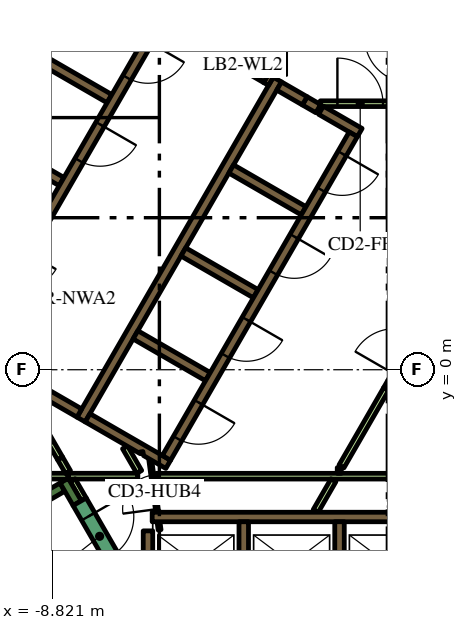
"""IFC4 building model, lengths in metres.
Left out: names, types, materials, properties, quantities, classifications, styles, units other than length and angle.
Written with IfcOpenShell. Run it as: python <this file> out.ifc"""

import sys

from ifc_helpers import new_model, si_unit, direction, frame, frame_2d, origin, place, context, subcontext, project, spatial, polyline, rectangle, outline, extrude, element, fill, save


model = new_model("IFC4")
c1 = context("Model", 3, precision=1e-05, world=origin(), true_north=direction((0.0, 1.0)))
c2 = subcontext(c1, "Body", "Model", "MODEL_VIEW")
j1 = project(units=[si_unit("LENGTHUNIT", "METRE"), si_unit("PLANEANGLEUNIT", "RADIAN")], contexts=[c1])
p1 = place(None, origin())
s1 = spatial("IfcSite", under=j1, at=p1, CompositionType="ELEMENT")
p2 = place(p1, origin())
s2 = spatial("IfcBuilding", under=s1, at=p2, CompositionType="ELEMENT")
p3 = place(p2, frame((0.0, 0.0, 134.4)))
s3 = spatial("IfcBuildingStorey", under=s2, at=p3, CompositionType="ELEMENT", Elevation=134.4)
p4 = place(p3, frame((-14.268, 0.387, 0.0), z_axis=(0.0, 0.0, 1.0), x_axis=(0.499994617707, 0.866028511231, 0.0)))
e1 = element("IfcWall", 1, at=p4, inside=s3, PredefinedType="SOLIDWALL", context=c2, shape_type="SweptSolid", body=[
    extrude(rectangle(XDim=18.817, YDim=0.9, at=frame_2d((9.409, 0.0))), origin(), (0.0, 0.0, 1.0), 7.2),
])
p5 = place(p3, frame((-14.44, -6.49, 0.0), z_axis=(0.0, 0.0, 1.0), x_axis=(0.866022966069, 0.500004222222, 0.0)))
e2 = element("IfcWall", 2, at=p5, inside=s3, PredefinedType="SOLIDWALL", context=c2, shape_type="SweptSolid", body=[
    extrude(rectangle(XDim=6.8, YDim=0.25, at=frame_2d((3.4, 0.0))), origin(), (0.0, 0.0, 1.0), 7.2),
])
p6 = place(p3, frame((-8.163, -3.511, 0.0), z_axis=(0.0, 0.0, 1.0), x_axis=(-0.500206266495, 0.865906283012, 0.0)))
e3 = element("IfcWall", 3, at=p6, inside=s3, PredefinedType="SOLIDWALL", context=c2, shape_type="SweptSolid", body=[
    extrude(rectangle(XDim=0.684, YDim=0.25, at=frame_2d((0.342, 0.0))), origin(), (0.0, 0.0, 1.0), 7.2),
])
p7 = place(p3, frame((-6.3, -4.24, 0.0), z_axis=(0.0, 0.0, 1.0), x_axis=(0.0, -1.0, 0.0)))
e4 = element("IfcWall", 4, at=p7, inside=s3, PredefinedType="SOLIDWALL", context=c2, shape_type="SweptSolid", body=[
    extrude(rectangle(XDim=2.914, YDim=0.25, at=frame_2d((1.457, 0.0))), origin(), (0.0, 0.0, 1.0), 7.2),
])
p8 = place(p3, frame((-6.19, -3.875, 0.0), z_axis=(0.0, 0.0, 1.0), x_axis=(1.0, 0.0, 0.0)))
e5 = element("IfcWall", 5, at=p8, inside=s3, PredefinedType="SOLIDWALL", context=c2, shape_type="SweptSolid", body=[
    extrude(rectangle(XDim=12.615, YDim=0.25, at=frame_2d((6.307, 0.0))), origin(), (0.0, 0.0, 1.0), 7.2),
])
for number, where, z_axis, x_axis in (
    (6, (-1.26, -4.0, 0.0), (0.0, 0.0, 1.0), (0.0, -1.0, 0.0)),
    (7, (-3.78, -4.0, 0.0), (0.0, 0.0, 1.0), (0.0, -1.0, 0.0)),
):
    element("IfcWall", number, at=place(p3, frame(where, z_axis=z_axis, x_axis=x_axis)), inside=s3, PredefinedType="SOLIDWALL", context=c2, shape_type="SweptSolid", body=[
        extrude(rectangle(XDim=2.2, YDim=0.25, at=frame_2d((1.1, 0.0))), origin(), (0.0, 0.0, 1.0), 7.2),
    ])
p9 = place(p3, frame((-8.06, -1.311, 0.0), z_axis=(0.0, 0.0, 1.0), x_axis=(0.50000273126, 0.866023826885, 0.0)))
e8 = element("IfcWall", 8, at=p9, inside=s3, PredefinedType="SOLIDWALL", context=c2, shape_type="SweptSolid", body=[
    extrude(rectangle(XDim=10.33, YDim=0.25, at=frame_2d((5.165, 0.0))), origin(), (0.0, 0.0, 1.0), 7.2),
])
p10 = place(p3, frame((-1.819, 6.87, 0.0), z_axis=(0.0, 0.0, 1.0), x_axis=(-0.866294599386, 0.499533449405, 0.0)))
e9 = element("IfcWall", 9, at=p10, inside=s3, PredefinedType="SOLIDWALL", context=c2, shape_type="SweptSolid", body=[
    extrude(rectangle(XDim=0.41, YDim=0.25, at=frame_2d((0.205, 0.0))), origin(), (0.0, 0.0, 1.0), 7.2),
])
p11 = place(p3, frame((-2.849, 7.465, 0.0), z_axis=(0.0, 0.0, 1.0), x_axis=(0.865955664968, -0.500120771724, 0.0)))
e10 = element("IfcWall", 10, at=p11, inside=s3, PredefinedType="SOLIDWALL", context=c2, shape_type="SweptSolid", body=[
    extrude(rectangle(XDim=0.778, YDim=0.25, at=frame_2d((0.389, 0.0))), origin(), (0.0, 0.0, 1.0), 7.2),
])
p12 = place(p3, frame((-0.728, 6.24, 0.0), z_axis=(0.0, 0.0, 1.0), x_axis=(-0.866002680491, 0.500039355833, 0.0)))
e11 = element("IfcWall", 11, at=p12, inside=s3, PredefinedType="SOLIDWALL", context=c2, shape_type="SweptSolid", body=[
    extrude(rectangle(XDim=1.178, YDim=0.25, at=frame_2d((0.589, 0.0))), origin(), (0.0, 0.0, 1.0), 7.2),
])
for number, where, z_axis, x_axis in (
    (12, (-2.204, 4.182, 0.0), (0.0, 0.0, 1.0), (-0.866, 0.5, 0.0)),
    (13, (-5.369, 3.1, 0.0), (0.0, 0.0, 1.0), (0.866, -0.5, 0.0)),
    (14, (-4.724, -0.182, 0.0), (0.0, 0.0, 1.0), (-0.866, 0.5, 0.0)),
):
    element("IfcWall", number, at=place(p3, frame(where, z_axis=z_axis, x_axis=x_axis)), inside=s3, PredefinedType="SOLIDWALL", context=c2, shape_type="SweptSolid", body=[
        extrude(rectangle(XDim=2.2, YDim=0.25, at=frame_2d((1.1, 0.0))), origin(), (0.0, 0.0, 1.0), 7.2),
    ])
p13 = place(p3, origin())
e15 = element("IfcWall", 15, at=p13, inside=s3, PredefinedType="SOLIDWALL", context=c2, shape_type="SweptSolid", body=[
    extrude(outline(polyline([(-5.922, -2.257), (-5.922, -2.257), (-5.705, -2.382), (-5.83, -2.598), (-6.418, -2.258), (-6.433, -2.153), (-6.433, -2.153), (-6.433, -2.153), (-6.508, -2.163), (-6.508, -2.163), (-6.508, -2.163), (-6.501, -2.21), (-7.952, -1.373), (-7.827, -1.156), (-5.922, -2.257)])), origin(), (0.0, 0.0, 1.0), 7.2),
])
p14 = place(p3, frame((-9.265, -0.471, 0.0), z_axis=(0.0, 0.0, 1.0), x_axis=(0.865954634268, -0.500122556369, 0.0)))
e16 = element("IfcWall", 16, at=p14, inside=s3, PredefinedType="SOLIDWALL", context=c2, shape_type="SweptSolid", body=[
    extrude(rectangle(XDim=1.338, YDim=0.25, at=frame_2d((0.669, 0.0))), origin(), (0.0, 0.0, 1.0), 7.2),
])
e17 = element("IfcWall", 17, at=p13, inside=s3, PredefinedType="SOLIDWALL", context=c2, shape_type="SweptSolid", body=[
    extrude(outline(polyline([(-3.128, 7.481), (-3.259, 7.557), (-3.134, 7.773), (-3.003, 7.698), (-3.128, 7.481)])), origin(), (0.0, 0.0, 1.0), 7.2),
])
for number, where, z_axis, x_axis in (
    (18, (-8.574, 4.95, 0.0), (0.0, 0.0, 1.0), (-0.866, 0.5, 0.0)),
    (19, (-7.314, 7.132, 0.0), (0.0, 0.0, 1.0), (-0.866, 0.5, 0.0)),
):
    element("IfcWall", number, at=place(p3, frame(where, z_axis=z_axis, x_axis=x_axis)), inside=s3, PredefinedType="SOLIDWALL", context=c2, shape_type="SweptSolid", body=[
        extrude(rectangle(XDim=2.2, YDim=0.25, at=frame_2d((1.1, 0.0))), origin(), (0.0, 0.0, 1.0), 7.2),
    ])
p15 = place(p3, frame((-7.959, 10.415, 0.0), z_axis=(0.0, 0.0, 1.0), x_axis=(0.866020958405, -0.500007699544, 0.0)))
e20 = element("IfcWall", 20, at=p15, inside=s3, PredefinedType="SOLIDWALL", context=c2, shape_type="SweptSolid", body=[
    extrude(rectangle(XDim=4.1, YDim=0.25, at=frame_2d((2.05, 0.0))), origin(), (0.0, 0.0, 1.0), 7.2),
])
p16 = place(p3, frame((-8.395, -2.8, 0.0), z_axis=(0.0, 0.0, 1.0), x_axis=(1.0, 0.0, 0.0)))
e21 = element("IfcWall", 21, at=p16, inside=s3, PredefinedType="PARTITIONING", context=c2, shape_type="SweptSolid", body=[
    extrude(rectangle(XDim=1.828, YDim=0.15, at=frame_2d((0.914, 0.0))), origin(), (0.0, 0.0, 1.0), 6.15),
])
p17 = place(p3, frame((-11.115, -2.8, 0.0), z_axis=(0.0, 0.0, 1.0), x_axis=(1.0, 0.0, 0.0)))
e22 = element("IfcWall", 22, at=p17, inside=s3, PredefinedType="PARTITIONING", context=c2, shape_type="SweptSolid", body=[
    extrude(rectangle(XDim=2.708, YDim=0.15, at=frame_2d((1.354, 0.0))), origin(), (0.0, 0.0, 1.0), 6.15),
])
p18 = place(p3, frame((-6.531, -2.689, 0.0), z_axis=(0.0, 0.0, 1.0), x_axis=(-0.499967446111, 0.866044197965, 0.0)))
e23 = element("IfcWall", 23, at=p18, inside=s3, PredefinedType="PARTITIONING", context=c2, shape_type="SweptSolid", body=[
    extrude(rectangle(XDim=0.748, YDim=0.15, at=frame_2d((0.374, 0.0))), origin(), (0.0, 0.0, 1.0), 6.15),
])
p19 = place(p3, frame((-7.99, -3.412, 0.0), z_axis=(0.0, 0.0, 1.0), x_axis=(-0.500193841991, 0.86591346013, 0.0)))
e24 = element("IfcWall", 24, at=p19, inside=s3, PredefinedType="PARTITIONING", context=c2, shape_type="SweptSolid", body=[
    extrude(rectangle(XDim=0.583, YDim=0.15, at=frame_2d((0.292, 0.0))), origin(), (0.0, 0.0, 1.0), 6.15),
])
p20 = place(p3, frame((-8.612, -2.333, 0.0), z_axis=(0.0, 0.0, 1.0), x_axis=(0.500248216681, -0.86588204838, 0.0)))
e25 = element("IfcWall", 25, at=p20, inside=s3, PredefinedType="PARTITIONING", context=c2, shape_type="SweptSolid", body=[
    extrude(rectangle(XDim=0.415, YDim=0.15, at=frame_2d((0.208, 0.0))), origin(), (0.0, 0.0, 1.0), 6.15),
])
p21 = place(p3, frame((-6.086, -2.801, 0.0), z_axis=(0.0, 0.0, 1.0), x_axis=(1.0, 0.0, 0.0)))
e26 = element("IfcWall", 26, at=p21, inside=s3, PredefinedType="PARTITIONING", context=c2, shape_type="SweptSolid", body=[
    extrude(rectangle(XDim=7.524, YDim=0.15, at=frame_2d((3.762, 0.0))), origin(), (0.0, 0.0, 1.0), 6.15),
])
p22 = place(p3, frame((-1.887, -3.718, 0.0), z_axis=(0.0, 0.0, 1.0), x_axis=(0.499842898591, 0.866116087328, 0.0)))
e27 = element("IfcWall", 27, at=p22, inside=s3, PredefinedType="PARTITIONING", context=c2, shape_type="SweptSolid", body=[
    extrude(rectangle(XDim=0.936, YDim=0.15, at=frame_2d((0.468, 0.0))), origin(), (0.0, 0.0, 1.0), 6.15),
])
p23 = place(p3, frame((-1.212, -2.651, 0.0), z_axis=(0.0, 0.0, 1.0), x_axis=(-1.0, 0.0, 0.0)))
e28 = element("IfcWall", 28, at=p23, inside=s3, PredefinedType="PARTITIONING", context=c2, shape_type="SweptSolid", body=[
    extrude(rectangle(XDim=0.108, YDim=0.15, at=frame_2d((0.054, 0.0))), origin(), (0.0, 0.0, 1.0), 6.15),
])
p24 = place(p3, frame((-1.208, -2.544, 0.0), z_axis=(0.0, 0.0, 1.0), x_axis=(0.499995339376, 0.86602809458, 0.0)))
e29 = element("IfcWall", 29, at=p24, inside=s3, PredefinedType="PARTITIONING", context=c2, shape_type="SweptSolid", body=[
    extrude(rectangle(XDim=2.349, YDim=0.15, at=frame_2d((1.175, 0.0))), origin(), (0.0, 0.0, 1.0), 6.15),
])
p25 = place(p3, frame((-6.008, 9.144, 0.0), z_axis=(0.0, 0.0, 1.0), x_axis=(-0.500006956611, -0.866021387346, 0.0)))
e30 = element("IfcWall", 30, at=p25, inside=s3, PredefinedType="SOLIDWALL", context=c2, shape_type="SweptSolid", body=[
    extrude(rectangle(XDim=9.83, YDim=0.25, at=frame_2d((4.915, 0.0))), origin(), (0.0, 0.0, 1.0), 7.2),
])
p26 = place(p25, frame((0.585, 0.0, 0.0)))
e31 = element("IfcOpeningElement", 31, at=p26, cuts=e30, PredefinedType="OPENING", context=c2, shape_type="SweptSolid", body=[
    extrude(rectangle(XDim=1.1, YDim=2.1, at=frame_2d((0.55, 1.05))), frame((0.0, 0.135, 0.0), z_axis=(0.0, -1.0, 0.0), x_axis=(1.0, 0.0, 0.0)), (0.0, 0.0, 1.0), 0.27),
])
p27 = place(p25, frame((3.105, 0.0, 0.0)))
e32 = element("IfcOpeningElement", 32, at=p27, cuts=e30, PredefinedType="OPENING", context=c2, shape_type="SweptSolid", body=[
    extrude(rectangle(XDim=1.1, YDim=2.1, at=frame_2d((0.55, 1.05))), frame((0.0, 0.135, 0.0), z_axis=(0.0, -1.0, 0.0), x_axis=(1.0, 0.0, 0.0)), (0.0, 0.0, 1.0), 0.27),
])
p28 = place(p25, frame((6.985, 0.0, 0.0)))
e33 = element("IfcOpeningElement", 33, at=p28, cuts=e30, PredefinedType="OPENING", context=c2, shape_type="SweptSolid", body=[
    extrude(rectangle(XDim=0.9, YDim=2.1, at=frame_2d((0.45, 1.05))), frame((0.0, 0.135, 0.0), z_axis=(0.0, -1.0, 0.0), x_axis=(1.0, 0.0, 0.0)), (0.0, 0.0, 1.0), 0.27),
])
p29 = place(p3, frame((-0.898, 6.194, 0.0), z_axis=(0.0, 0.0, 1.0), x_axis=(-0.499996202215, -0.866027596426, 0.0)))
e34 = element("IfcWall", 34, at=p29, inside=s3, PredefinedType="SOLIDWALL", context=c2, shape_type="SweptSolid", body=[
    extrude(rectangle(XDim=9.83, YDim=0.25, at=frame_2d((4.915, 0.0))), origin(), (0.0, 0.0, 1.0), 7.2),
])
p30 = place(p29, frame((0.585, 0.0, 0.0)))
e35 = element("IfcOpeningElement", 35, at=p30, cuts=e34, PredefinedType="OPENING", context=c2, shape_type="SweptSolid", body=[
    extrude(rectangle(XDim=1.1, YDim=2.1, at=frame_2d((0.55, 1.05))), frame((0.0, 0.135, 0.0), z_axis=(0.0, -1.0, 0.0), x_axis=(1.0, 0.0, 0.0)), (0.0, 0.0, 1.0), 0.27),
])
p31 = place(p29, frame((3.105, 0.0, 0.0)))
e36 = element("IfcOpeningElement", 36, at=p31, cuts=e34, PredefinedType="OPENING", context=c2, shape_type="SweptSolid", body=[
    extrude(rectangle(XDim=1.1, YDim=2.1, at=frame_2d((0.55, 1.05))), frame((0.0, 0.135, 0.0), z_axis=(0.0, -1.0, 0.0), x_axis=(1.0, 0.0, 0.0)), (0.0, 0.0, 1.0), 0.27),
])
p32 = place(p29, frame((5.625, 0.0, 0.0)))
e37 = element("IfcOpeningElement", 37, at=p32, cuts=e34, PredefinedType="OPENING", context=c2, shape_type="SweptSolid", body=[
    extrude(rectangle(XDim=1.1, YDim=2.1, at=frame_2d((0.55, 1.05))), frame((0.0, 0.135, 0.0), z_axis=(0.0, -1.0, 0.0), x_axis=(1.0, 0.0, 0.0)), (0.0, 0.0, 1.0), 0.27),
])
p33 = place(p29, frame((8.145, 0.0, 0.0)))
e38 = element("IfcOpeningElement", 38, at=p33, cuts=e34, PredefinedType="OPENING", context=c2, shape_type="SweptSolid", body=[
    extrude(rectangle(XDim=1.1, YDim=2.1, at=frame_2d((0.55, 1.05))), frame((0.0, 0.135, 0.0), z_axis=(0.0, -1.0, 0.0), x_axis=(1.0, 0.0, 0.0)), (0.0, 0.0, 1.0), 0.27),
])
p34 = place(p3, frame((-8.098, -3.474, 0.0), z_axis=(0.0, 0.0, 1.0), x_axis=(0.49994051562, -0.866059744384, 0.0)))
e39 = element("IfcWall", 39, at=p34, inside=s3, PredefinedType="SOLIDWALL", context=c2, shape_type="SweptSolid", body=[
    extrude(rectangle(XDim=2.1, YDim=0.4, at=frame_2d((1.05, 0.0))), origin(), (0.0, 0.0, 1.0), 7.2),
])
p35 = place(p34, frame((0.45, 0.0, 0.0)))
e40 = element("IfcOpeningElement", 40, at=p35, cuts=e39, PredefinedType="OPENING", context=c2, shape_type="SweptSolid", body=[
    extrude(rectangle(XDim=1.2, YDim=2.1, at=frame_2d((0.6, 1.05))), frame((0.0, 0.21, 0.0), z_axis=(0.0, -1.0, 0.0), x_axis=(1.0, 0.0, 0.0)), (0.0, 0.0, 1.0), 0.42),
])
p36 = place(p3, frame((-1.765, 7.0, 0.0), z_axis=(0.0, 0.0, 1.0), x_axis=(1.0, 0.0, 0.0)))
e41 = element("IfcWall", 41, at=p36, inside=s3, PredefinedType="PARTITIONING", context=c2, shape_type="SweptSolid", body=[
    extrude(rectangle(XDim=2.1, YDim=0.15, at=frame_2d((1.05, 0.0))), origin(), (0.0, 0.0, 1.0), 6.15),
])
p37 = place(p36, frame((0.45, 0.0, 0.0)))
e42 = element("IfcOpeningElement", 42, at=p37, cuts=e41, PredefinedType="OPENING", context=c2, shape_type="SweptSolid", body=[
    extrude(rectangle(XDim=1.2, YDim=2.1, at=frame_2d((0.6, 1.05))), frame((0.0, 0.085, 0.0), z_axis=(0.0, -1.0, 0.0), x_axis=(1.0, 0.0, 0.0)), (0.0, 0.0, 1.0), 0.17),
])
p38 = place(p3, frame((-0.034, -0.509, 0.0), z_axis=(0.0, 0.0, 1.0), x_axis=(0.49994051562, 0.866059744384, 0.0)))
e43 = element("IfcWall", 43, at=p38, inside=s3, PredefinedType="PARTITIONING", context=c2, shape_type="SweptSolid", body=[
    extrude(rectangle(XDim=2.1, YDim=0.15, at=frame_2d((1.05, 0.0))), origin(), (0.0, 0.0, 1.0), 6.15),
])
p39 = place(p38, frame((0.45, 0.0, 0.0)))
e44 = element("IfcOpeningElement", 44, at=p39, cuts=e43, PredefinedType="OPENING", context=c2, shape_type="SweptSolid", body=[
    extrude(rectangle(XDim=1.2, YDim=2.1, at=frame_2d((0.6, 1.05))), frame((0.0, 0.085, 0.0), z_axis=(0.0, -1.0, 0.0), x_axis=(1.0, 0.0, 0.0)), (0.0, 0.0, 1.0), 0.17),
])
p40 = place(p3, frame((-5.995, -4.213, 0.0), z_axis=(0.0, 0.0, 1.0), x_axis=(-0.132072335448, 0.991240081014, 0.0)))
e45 = element("IfcWall", 45, at=p40, inside=s3, PredefinedType="PARTITIONING", context=c2, shape_type="SweptSolid", body=[
    extrude(rectangle(XDim=2.1, YDim=0.076, at=frame_2d((1.05, 0.0))), origin(), (0.0, 0.0, 1.0), 6.15),
])
p41 = place(p40, frame((0.55, 0.0, 0.0)))
e46 = element("IfcOpeningElement", 46, at=p41, cuts=e45, PredefinedType="OPENING", context=c2, shape_type="SweptSolid", body=[
    extrude(rectangle(XDim=0.9, YDim=2.1, at=frame_2d((0.45, 1.05))), frame((0.0, 0.048, 0.0), z_axis=(0.0, -1.0, 0.0), x_axis=(1.0, 0.0, 0.0)), (0.0, 0.0, 1.0), 0.096),
])
p42 = place(p3, frame((-4.409, 8.365, 0.0), z_axis=(0.0, 0.0, 1.0), x_axis=(0.866034573852, -0.49998411664, 0.0)))
e47 = element("IfcWall", 47, at=p42, inside=s3, PredefinedType="SOLIDWALL", context=c2, shape_type="SweptSolid", body=[
    extrude(rectangle(XDim=1.4, YDim=0.25, at=frame_2d((0.7, 0.0))), origin(), (0.0, 0.0, 1.0), 7.2),
])
p43 = place(p42, frame((0.1, 0.0, 0.0)))
e48 = element("IfcOpeningElement", 48, at=p43, cuts=e47, PredefinedType="OPENING", context=c2, shape_type="SweptSolid", body=[
    extrude(rectangle(XDim=1.2, YDim=2.1, at=frame_2d((0.6, 1.05))), frame((0.0, 0.135, 0.0), z_axis=(0.0, -1.0, 0.0), x_axis=(1.0, 0.0, 0.0)), (0.0, 0.0, 1.0), 0.27),
])
p44 = place(p3, frame((-8.612, -2.333, 0.0), z_axis=(0.0, 0.0, 1.0), x_axis=(-0.499961193289, 0.866047807691, 0.0)))
e49 = element("IfcWall", 49, at=p44, inside=s3, PredefinedType="PARTITIONING", context=c2, shape_type="SweptSolid", body=[
    extrude(rectangle(XDim=1.8, YDim=0.15, at=frame_2d((0.9, 0.0))), origin(), (0.0, 0.0, 1.0), 6.15),
])
p45 = place(p44, frame((0.45, 0.0, 0.0)))
e50 = element("IfcOpeningElement", 50, at=p45, cuts=e49, PredefinedType="OPENING", context=c2, shape_type="SweptSolid", body=[
    extrude(rectangle(XDim=0.9, YDim=2.1, at=frame_2d((0.45, 1.05))), frame((0.0, 0.085, 0.0), z_axis=(0.0, -1.0, 0.0), x_axis=(1.0, 0.0, 0.0)), (0.0, 0.0, 1.0), 0.17),
])
p46 = place(p3, frame((-6.639, 19.3, 0.0), z_axis=(0.0, 0.0, 1.0), x_axis=(-0.500001456469, -0.86602456289, 0.0)))
e51 = element("IfcWall", 51, at=p46, inside=s3, PredefinedType="PARTITIONING", context=c2, shape_type="SweptSolid", body=[
    extrude(rectangle(XDim=22.774, YDim=0.15, at=frame_2d((11.387, 0.0))), origin(), (0.0, 0.0, 1.0), 6.15),
])
p47 = place(p46, frame((10.487, 0.0, 0.0)))
e52 = element("IfcOpeningElement", 52, at=p47, cuts=e51, PredefinedType="OPENING", context=c2, shape_type="SweptSolid", body=[
    extrude(rectangle(XDim=1.8, YDim=2.1, at=frame_2d((0.9, 1.05))), frame((0.0, 0.085, 0.0), z_axis=(0.0, -1.0, 0.0), x_axis=(1.0, 0.0, 0.0)), (0.0, 0.0, 1.0), 0.17),
])
p48 = place(p46, frame((7.377, 0.0, 0.0)))
e53 = element("IfcOpeningElement", 53, at=p48, cuts=e51, PredefinedType="OPENING", context=c2, shape_type="SweptSolid", body=[
    extrude(rectangle(XDim=1.8, YDim=2.1, at=frame_2d((0.9, 1.05))), frame((0.0, 0.085, 0.0), z_axis=(0.0, -1.0, 0.0), x_axis=(1.0, 0.0, 0.0)), (0.0, 0.0, 1.0), 0.17),
])
p49 = place(p26, origin())
e54 = element("IfcDoor", 54, at=p49, inside=s3, OperationType="DOUBLE_DOOR_SLIDING", PredefinedType="DOOR", context=c2, shape_type="SweptSolid", body=[
    extrude(rectangle(XDim=1.1, YDim=2.1, at=frame_2d((0.55, 1.05))), frame((0.0, 0.025, 0.0), z_axis=(0.0, -1.0, 0.0), x_axis=(1.0, 0.0, 0.0)), (0.0, 0.0, 1.0), 0.05),
])
fill(e31, e54)
p50 = place(p27, origin())
e55 = element("IfcDoor", 55, at=p50, inside=s3, OperationType="DOUBLE_DOOR_SLIDING", PredefinedType="DOOR", context=c2, shape_type="SweptSolid", body=[
    extrude(rectangle(XDim=1.1, YDim=2.1, at=frame_2d((0.55, 1.05))), frame((0.0, 0.025, 0.0), z_axis=(0.0, -1.0, 0.0), x_axis=(1.0, 0.0, 0.0)), (0.0, 0.0, 1.0), 0.05),
])
fill(e32, e55)
p51 = place(p30, origin())
e56 = element("IfcDoor", 56, at=p51, inside=s3, OperationType="DOUBLE_DOOR_SLIDING", PredefinedType="DOOR", context=c2, shape_type="SweptSolid", body=[
    extrude(rectangle(XDim=1.1, YDim=2.1, at=frame_2d((0.55, 1.05))), frame((0.0, 0.025, 0.0), z_axis=(0.0, -1.0, 0.0), x_axis=(1.0, 0.0, 0.0)), (0.0, 0.0, 1.0), 0.05),
])
fill(e35, e56)
p52 = place(p31, origin())
e57 = element("IfcDoor", 57, at=p52, inside=s3, OperationType="DOUBLE_DOOR_SLIDING", PredefinedType="DOOR", context=c2, shape_type="SweptSolid", body=[
    extrude(rectangle(XDim=1.1, YDim=2.1, at=frame_2d((0.55, 1.05))), frame((0.0, 0.025, 0.0), z_axis=(0.0, -1.0, 0.0), x_axis=(1.0, 0.0, 0.0)), (0.0, 0.0, 1.0), 0.05),
])
fill(e36, e57)
p53 = place(p32, origin())
e58 = element("IfcDoor", 58, at=p53, inside=s3, OperationType="DOUBLE_DOOR_SLIDING", PredefinedType="DOOR", context=c2, shape_type="SweptSolid", body=[
    extrude(rectangle(XDim=1.1, YDim=2.1, at=frame_2d((0.55, 1.05))), frame((0.0, 0.025, 0.0), z_axis=(0.0, -1.0, 0.0), x_axis=(1.0, 0.0, 0.0)), (0.0, 0.0, 1.0), 0.05),
])
fill(e37, e58)
p54 = place(p33, origin())
e59 = element("IfcDoor", 59, at=p54, inside=s3, OperationType="DOUBLE_DOOR_SLIDING", PredefinedType="DOOR", context=c2, shape_type="SweptSolid", body=[
    extrude(rectangle(XDim=1.1, YDim=2.1, at=frame_2d((0.55, 1.05))), frame((0.0, 0.025, 0.0), z_axis=(0.0, -1.0, 0.0), x_axis=(1.0, 0.0, 0.0)), (0.0, 0.0, 1.0), 0.05),
])
fill(e38, e59)
p55 = place(p35, origin())
e60 = element("IfcDoor", 60, at=p55, inside=s3, OperationType="SINGLE_SWING_LEFT", PredefinedType="DOOR", context=c2, shape_type="SweptSolid", body=[
    extrude(rectangle(XDim=1.2, YDim=2.1, at=frame_2d((0.6, 1.05))), frame((0.0, 0.025, 0.0), z_axis=(0.0, -1.0, 0.0), x_axis=(1.0, 0.0, 0.0)), (0.0, 0.0, 1.0), 0.05),
])
fill(e40, e60)
p56 = place(p37, origin())
e61 = element("IfcDoor", 61, at=p56, inside=s3, OperationType="SINGLE_SWING_LEFT", PredefinedType="DOOR", context=c2, shape_type="SweptSolid", body=[
    extrude(rectangle(XDim=1.2, YDim=2.1, at=frame_2d((0.6, 1.05))), frame((0.0, 0.025, 0.0), z_axis=(0.0, -1.0, 0.0), x_axis=(1.0, 0.0, 0.0)), (0.0, 0.0, 1.0), 0.05),
])
fill(e42, e61)
p57 = place(p41, origin())
e62 = element("IfcDoor", 62, at=p57, inside=s3, OperationType="SINGLE_SWING_LEFT", PredefinedType="DOOR", context=c2, shape_type="SweptSolid", body=[
    extrude(rectangle(XDim=0.9, YDim=2.1, at=frame_2d((0.45, 1.05))), frame((0.0, 0.025, 0.0), z_axis=(0.0, -1.0, 0.0), x_axis=(1.0, 0.0, 0.0)), (0.0, 0.0, 1.0), 0.05),
])
fill(e46, e62)
p58 = place(p43, origin())
e63 = element("IfcDoor", 63, at=p58, inside=s3, OperationType="SINGLE_SWING_LEFT", PredefinedType="DOOR", context=c2, shape_type="SweptSolid", body=[
    extrude(rectangle(XDim=1.2, YDim=2.1, at=frame_2d((0.6, 1.05))), frame((0.0, 0.025, 0.0), z_axis=(0.0, -1.0, 0.0), x_axis=(1.0, 0.0, 0.0)), (0.0, 0.0, 1.0), 0.05),
])
fill(e48, e63)
p59 = place(p45, origin())
e64 = element("IfcDoor", 64, at=p59, inside=s3, OperationType="SINGLE_SWING_LEFT", PredefinedType="DOOR", context=c2, shape_type="SweptSolid", body=[
    extrude(rectangle(XDim=0.9, YDim=2.1, at=frame_2d((0.45, 1.05))), frame((0.0, 0.025, 0.0), z_axis=(0.0, -1.0, 0.0), x_axis=(1.0, 0.0, 0.0)), (0.0, 0.0, 1.0), 0.05),
])
fill(e50, e64)
save(model, sys.argv[1])
